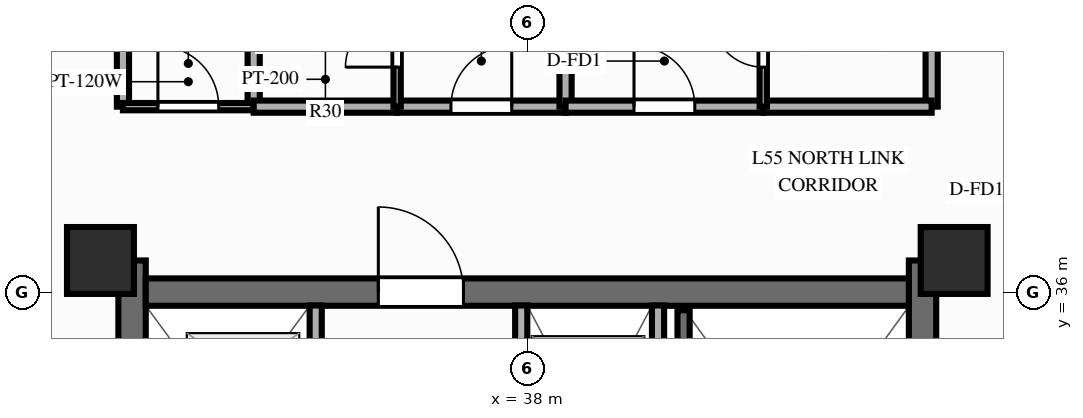
"""IFC4 building model, lengths in metres.
Left out: names, types, materials, properties, quantities, classifications, styles, units other than length and angle.
Written with IfcOpenShell. Run it as: python <this file> out.ifc"""

import sys

from ifc_helpers import new_model, si_unit, direction, frame, frame_2d, origin, origin_2d, place, context, subcontext, project, spatial, rectangle, extrude, source, transform, mapped, element, fill, save


model = new_model("IFC4")
c1 = context("Model", 3, precision=1e-05, world=origin(), true_north=direction((0.0, 1.0)))
c2 = subcontext(c1, "Body", "Model", "MODEL_VIEW")
j1 = project(units=[si_unit("LENGTHUNIT", "METRE"), si_unit("PLANEANGLEUNIT", "RADIAN")], contexts=[c1])
p1 = place(None, origin())
s1 = spatial("IfcSite", under=j1, at=p1, CompositionType="ELEMENT")
p2 = place(p1, origin())
s2 = spatial("IfcBuilding", under=s1, at=p2, CompositionType="ELEMENT")
p3 = place(p2, frame((0.0, 0.0, 176.8)))
s3 = spatial("IfcBuildingStorey", under=s2, at=p3, CompositionType="ELEMENT", Elevation=176.8)
p4 = place(p3, frame((31.5, 17.48, 0.0), z_axis=(0.0, 0.0, 1.0), x_axis=(0.0, 1.0, 0.0)))
e1 = element("IfcWall", 1, at=p4, inside=s3, PredefinedType="SHEAR", context=c2, shape_type="SweptSolid", body=[
    extrude(rectangle(XDim=19.04, YDim=0.45, at=frame_2d((9.52, 0.0))), origin(), (0.0, 0.0, 1.0), 3.0),
])
p5 = place(p4, frame((6.32, 0.0, 0.0)))
e2 = element("IfcOpeningElement", 2, at=p5, cuts=e1, PredefinedType="OPENING", context=c2, shape_type="SweptSolid", body=[
    extrude(rectangle(XDim=1.1, YDim=2.15, at=frame_2d((0.55, 1.075))), frame((0.0, 0.237, 0.0), z_axis=(0.0, -1.0, 0.0), x_axis=(1.0, 0.0, 0.0)), (0.0, 0.0, 1.0), 0.474),
])
p6 = place(p3, frame((44.5, 17.48, 0.0), z_axis=(0.0, 0.0, 1.0), x_axis=(0.0, 1.0, 0.0)))
e3 = element("IfcWall", 3, at=p6, inside=s3, PredefinedType="SHEAR", context=c2, shape_type="SweptSolid", body=[
    extrude(rectangle(XDim=19.04, YDim=0.45, at=frame_2d((9.52, 0.0))), origin(), (0.0, 0.0, 1.0), 3.0),
])
p7 = place(p6, frame((12.67, 0.0, 0.0), z_axis=(0.0, 0.0, 1.0), x_axis=(-1.0, 0.0, 0.0)))
e4 = element("IfcOpeningElement", 4, at=p7, cuts=e3, PredefinedType="OPENING", context=c2, shape_type="SweptSolid", body=[
    extrude(rectangle(XDim=1.1, YDim=2.15, at=frame_2d((0.55, 1.075))), frame((0.0, 0.237, 0.0), z_axis=(0.0, -1.0, 0.0), x_axis=(1.0, 0.0, 0.0)), (0.0, 0.0, 1.0), 0.474),
])
p8 = place(p3, frame((31.725, 36.0, 0.0), z_axis=(0.0, 0.0, 1.0), x_axis=(1.0, 0.0, 0.0)))
e5 = element("IfcWall", 5, at=p8, inside=s3, PredefinedType="SHEAR", context=c2, shape_type="SweptSolid", body=[
    extrude(rectangle(XDim=12.55, YDim=0.45, at=frame_2d((6.275, 0.0))), origin(), (0.0, 0.0, 1.0), 3.0),
])
p9 = place(p8, frame((5.225, 0.0, 0.0), z_axis=(0.0, 0.0, 1.0), x_axis=(-1.0, 0.0, 0.0)))
e6 = element("IfcOpeningElement", 6, at=p9, cuts=e5, PredefinedType="OPENING", context=c2, shape_type="SweptSolid", body=[
    extrude(rectangle(XDim=1.4, YDim=2.15, at=frame_2d((0.7, 1.075))), frame((0.0, 0.237, 0.0), z_axis=(0.0, -1.0, 0.0), x_axis=(1.0, 0.0, 0.0)), (0.0, 0.0, 1.0), 0.474),
])
m1 = source(origin(), c2, "Body", "SweptSolid", [
    extrude(rectangle(XDim=1.1, YDim=1.1, at=origin_2d()), origin(), (0.0, 0.0, 1.0), 3.0),
])
for number, where, z_axis, x_axis in (
    (7, (30.98, 36.52, 0.0), (0.0, 0.0, 1.0), (1.0, 0.0, 0.0)),
    (8, (45.02, 36.52, 0.0), (0.0, 0.0, 1.0), (1.0, 0.0, 0.0)),
):
    element("IfcColumn", number, at=place(p3, frame(where, z_axis=z_axis, x_axis=x_axis)), inside=s3, PredefinedType="COLUMN", context=c2, shape_type="MappedRepresentation", body=[
        mapped(m1, transform((0.0, 0.0, 0.0), scale=1.0)),
    ])
p10 = place(p3, frame((40.15, 31.8, 0.0), z_axis=(0.0, 0.0, 1.0), x_axis=(0.0, 1.0, 0.0)))
e9 = element("IfcWall", 9, at=p10, inside=s3, PredefinedType="PARTITIONING", context=c2, shape_type="SweptSolid", body=[
    extrude(rectangle(XDim=3.98, YDim=0.2, at=frame_2d((1.99, 0.0))), origin(), (0.0, 0.0, 1.0), 2.79),
])
p11 = place(p3, frame((40.57, 28.65, 0.0), z_axis=(0.0, 0.0, 1.0), x_axis=(0.0, 1.0, 0.0)))
e10 = element("IfcWall", 10, at=p11, inside=s3, PredefinedType="SOLIDWALL", context=c2, shape_type="SweptSolid", body=[
    extrude(rectangle(XDim=7.05, YDim=0.2, at=frame_2d((3.525, 0.0))), origin(), (0.0, 0.0, 1.0), 2.79),
])
p12 = place(p3, frame((34.52, 25.44, 0.0), z_axis=(0.0, 0.0, 1.0), x_axis=(0.0, 1.0, 0.0)))
e11 = element("IfcWall", 11, at=p12, inside=s3, PredefinedType="PARTITIONING", context=c2, shape_type="SweptSolid", body=[
    extrude(rectangle(XDim=10.34, YDim=0.2, at=frame_2d((5.17, 0.0))), origin(), (0.0, 0.0, 1.0), 2.79),
])
p13 = place(p12, frame((0.65, 0.0, 0.0)))
e12 = element("IfcOpeningElement", 12, at=p13, cuts=e11, PredefinedType="OPENING", context=c2, shape_type="SweptSolid", body=[
    extrude(rectangle(XDim=0.8, YDim=2.05, at=frame_2d((0.4, 1.025))), frame((0.0, 0.112, 0.0), z_axis=(0.0, -1.0, 0.0), x_axis=(1.0, 0.0, 0.0)), (0.0, 0.0, 1.0), 0.224),
])
p14 = place(p12, frame((2.75, 0.0, 0.0)))
e13 = element("IfcOpeningElement", 13, at=p14, cuts=e11, PredefinedType="OPENING", context=c2, shape_type="SweptSolid", body=[
    extrude(rectangle(XDim=0.8, YDim=2.05, at=frame_2d((0.4, 1.025))), frame((0.0, 0.112, 0.0), z_axis=(0.0, -1.0, 0.0), x_axis=(1.0, 0.0, 0.0)), (0.0, 0.0, 1.0), 0.224),
])
p15 = place(p12, frame((4.95, 0.0, 0.0)))
e14 = element("IfcOpeningElement", 14, at=p15, cuts=e11, PredefinedType="OPENING", context=c2, shape_type="SweptSolid", body=[
    extrude(rectangle(XDim=0.8, YDim=2.05, at=frame_2d((0.4, 1.025))), frame((0.0, 0.112, 0.0), z_axis=(0.0, -1.0, 0.0), x_axis=(1.0, 0.0, 0.0)), (0.0, 0.0, 1.0), 0.224),
])
p16 = place(p12, frame((7.01, 0.0, 0.0)))
e15 = element("IfcOpeningElement", 15, at=p16, cuts=e11, PredefinedType="OPENING", context=c2, shape_type="SweptSolid", body=[
    extrude(rectangle(XDim=1.0, YDim=2.15, at=frame_2d((0.5, 1.075))), frame((0.0, 0.112, 0.0), z_axis=(0.0, -1.0, 0.0), x_axis=(1.0, 0.0, 0.0)), (0.0, 0.0, 1.0), 0.224),
])
p17 = place(p12, frame((8.76, 0.0, 0.0)))
e16 = element("IfcOpeningElement", 16, at=p17, cuts=e11, PredefinedType="OPENING", context=c2, shape_type="SweptSolid", body=[
    extrude(rectangle(XDim=1.0, YDim=2.15, at=frame_2d((0.5, 1.075))), frame((0.0, 0.112, 0.0), z_axis=(0.0, -1.0, 0.0), x_axis=(1.0, 0.0, 0.0)), (0.0, 0.0, 1.0), 0.224),
])
p18 = place(p3, frame((37.9, 25.44, 0.0), z_axis=(0.0, 0.0, 1.0), x_axis=(0.0, 1.0, 0.0)))
e17 = element("IfcWall", 17, at=p18, inside=s3, PredefinedType="PARTITIONING", context=c2, shape_type="SweptSolid", body=[
    extrude(rectangle(XDim=10.34, YDim=0.2, at=frame_2d((5.17, 0.0))), origin(), (0.0, 0.0, 1.0), 2.79),
])
p19 = place(p18, frame((1.15, 0.0, 0.0)))
e18 = element("IfcOpeningElement", 18, at=p19, cuts=e17, PredefinedType="OPENING", context=c2, shape_type="SweptSolid", body=[
    extrude(rectangle(XDim=0.9, YDim=2.1, at=frame_2d((0.45, 1.05))), frame((0.0, 0.112, 0.0), z_axis=(0.0, -1.0, 0.0), x_axis=(1.0, 0.0, 0.0)), (0.0, 0.0, 1.0), 0.224),
])
p20 = place(p18, frame((4.2, 0.0, 0.0)))
e19 = element("IfcOpeningElement", 19, at=p20, cuts=e17, PredefinedType="OPENING", context=c2, shape_type="SweptSolid", body=[
    extrude(rectangle(XDim=0.9, YDim=2.1, at=frame_2d((0.45, 1.05))), frame((0.0, 0.112, 0.0), z_axis=(0.0, -1.0, 0.0), x_axis=(1.0, 0.0, 0.0)), (0.0, 0.0, 1.0), 0.224),
])
p21 = place(p18, frame((6.86, 0.0, 0.0)))
e20 = element("IfcOpeningElement", 20, at=p21, cuts=e17, PredefinedType="OPENING", context=c2, shape_type="SweptSolid", body=[
    extrude(rectangle(XDim=1.0, YDim=2.15, at=frame_2d((0.5, 1.075))), frame((0.0, 0.112, 0.0), z_axis=(0.0, -1.0, 0.0), x_axis=(1.0, 0.0, 0.0)), (0.0, 0.0, 1.0), 0.224),
])
p22 = place(p18, frame((8.71, 0.0, 0.0)))
e21 = element("IfcOpeningElement", 21, at=p22, cuts=e17, PredefinedType="OPENING", context=c2, shape_type="SweptSolid", body=[
    extrude(rectangle(XDim=1.0, YDim=2.15, at=frame_2d((0.5, 1.075))), frame((0.0, 0.112, 0.0), z_axis=(0.0, -1.0, 0.0), x_axis=(1.0, 0.0, 0.0)), (0.0, 0.0, 1.0), 0.224),
])
for number, where, z_axis, x_axis in (
    (22, (31.35, 39.05, 0.0), (0.0, 0.0, 1.0), (0.0, 1.0, 0.0)),
    (23, (44.65, 39.05, 0.0), (0.0, 0.0, 1.0), (0.0, 1.0, 0.0)),
):
    element("IfcWall", number, at=place(p3, frame(where, z_axis=z_axis, x_axis=x_axis)), inside=s3, PredefinedType="PARTITIONING", context=c2, shape_type="SweptSolid", body=[
        extrude(rectangle(XDim=8.8, YDim=0.2, at=frame_2d((4.4, 0.0))), origin(), (0.0, 0.0, 1.0), 2.39),
    ])
p23 = place(p3, frame((33.5, 39.05, 0.0), z_axis=(0.0, 0.0, 1.0), x_axis=(0.0, 1.0, 0.0)))
e24 = element("IfcWall", 24, at=p23, inside=s3, PredefinedType="PARTITIONING", context=c2, shape_type="SweptSolid", body=[
    extrude(rectangle(XDim=8.8, YDim=0.2, at=frame_2d((4.4, 0.0))), origin(), (0.0, 0.0, 1.0), 2.79),
])
p24 = place(p3, frame((31.35, 39.05, 0.0), z_axis=(0.0, 0.0, 1.0), x_axis=(1.0, 0.0, 0.0)))
e25 = element("IfcWall", 25, at=p24, inside=s3, PredefinedType="PARTITIONING", context=c2, shape_type="SweptSolid", body=[
    extrude(rectangle(XDim=2.15, YDim=0.12, at=frame_2d((1.075, 0.0))), origin(), (0.0, 0.0, 1.0), 2.79),
])
p25 = place(p24, frame((0.575, 0.0, 0.0)))
e26 = element("IfcOpeningElement", 26, at=p25, cuts=e25, PredefinedType="OPENING", context=c2, shape_type="SweptSolid", body=[
    extrude(rectangle(XDim=1.0, YDim=2.1, at=frame_2d((0.5, 1.05))), frame((0.0, 0.072, 0.0), z_axis=(0.0, -1.0, 0.0), x_axis=(1.0, 0.0, 0.0)), (0.0, 0.0, 1.0), 0.144),
])
p26 = place(p3, frame((33.5, 39.05, 0.0), z_axis=(0.0, 0.0, 1.0), x_axis=(1.0, 0.0, 0.0)))
e27 = element("IfcWall", 27, at=p26, inside=s3, PredefinedType="PARTITIONING", context=c2, shape_type="SweptSolid", body=[
    extrude(rectangle(XDim=2.359, YDim=0.2, at=frame_2d((1.18, 0.0))), origin(), (0.0, 0.0, 1.0), 2.79),
])
p27 = place(p3, frame((35.859, 39.05, 0.0), z_axis=(0.0, 0.0, 1.0), x_axis=(1.0, 0.0, 0.0)))
e28 = element("IfcWall", 28, at=p27, inside=s3, PredefinedType="PARTITIONING", context=c2, shape_type="SweptSolid", body=[
    extrude(rectangle(XDim=2.77, YDim=0.2, at=frame_2d((1.385, 0.0))), origin(), (0.0, 0.0, 1.0), 2.79),
])
p28 = place(p27, frame((0.885, 0.0, 0.0)))
e29 = element("IfcOpeningElement", 29, at=p28, cuts=e28, PredefinedType="OPENING", context=c2, shape_type="SweptSolid", body=[
    extrude(rectangle(XDim=1.0, YDim=2.15, at=frame_2d((0.5, 1.075))), frame((0.0, 0.112, 0.0), z_axis=(0.0, -1.0, 0.0), x_axis=(1.0, 0.0, 0.0)), (0.0, 0.0, 1.0), 0.224),
])
p29 = place(p3, frame((35.859, 39.05, 0.0), z_axis=(0.0, 0.0, 1.0), x_axis=(0.0, 1.0, 0.0)))
e30 = element("IfcWall", 30, at=p29, inside=s3, PredefinedType="PARTITIONING", context=c2, shape_type="SweptSolid", body=[
    extrude(rectangle(XDim=2.15, YDim=0.12, at=frame_2d((1.075, 0.0))), origin(), (0.0, 0.0, 1.0), 2.79),
])
p30 = place(p29, frame((0.65, 0.0, 0.0)))
e31 = element("IfcOpeningElement", 31, at=p30, cuts=e30, PredefinedType="OPENING", context=c2, shape_type="SweptSolid", body=[
    extrude(rectangle(XDim=0.85, YDim=2.05, at=frame_2d((0.425, 1.025))), frame((0.0, 0.072, 0.0), z_axis=(0.0, -1.0, 0.0), x_axis=(1.0, 0.0, 0.0)), (0.0, 0.0, 1.0), 0.144),
])
p31 = place(p3, frame((38.629, 39.05, 0.0), z_axis=(0.0, 0.0, 1.0), x_axis=(0.0, 1.0, 0.0)))
e32 = element("IfcWall", 32, at=p31, inside=s3, PredefinedType="PARTITIONING", context=c2, shape_type="SweptSolid", body=[
    extrude(rectangle(XDim=8.8, YDim=0.2, at=frame_2d((4.4, 0.0))), origin(), (0.0, 0.0, 1.0), 2.79),
])
p32 = place(p3, frame((38.629, 39.05, 0.0), z_axis=(0.0, 0.0, 1.0), x_axis=(1.0, 0.0, 0.0)))
e33 = element("IfcWall", 33, at=p32, inside=s3, PredefinedType="PARTITIONING", context=c2, shape_type="SweptSolid", body=[
    extrude(rectangle(XDim=3.251, YDim=0.2, at=frame_2d((1.626, 0.0))), origin(), (0.0, 0.0, 1.0), 2.79),
])
p33 = place(p32, frame((1.126, 0.0, 0.0)))
e34 = element("IfcOpeningElement", 34, at=p33, cuts=e33, PredefinedType="OPENING", context=c2, shape_type="SweptSolid", body=[
    extrude(rectangle(XDim=1.0, YDim=2.15, at=frame_2d((0.5, 1.075))), frame((0.0, 0.112, 0.0), z_axis=(0.0, -1.0, 0.0), x_axis=(1.0, 0.0, 0.0)), (0.0, 0.0, 1.0), 0.224),
])
p34 = place(p3, frame((41.88, 39.05, 0.0), z_axis=(0.0, 0.0, 1.0), x_axis=(1.0, 0.0, 0.0)))
e35 = element("IfcWall", 35, at=p34, inside=s3, PredefinedType="PARTITIONING", context=c2, shape_type="SweptSolid", body=[
    extrude(rectangle(XDim=2.77, YDim=0.2, at=frame_2d((1.385, 0.0))), origin(), (0.0, 0.0, 1.0), 2.79),
])
p35 = place(p3, frame((41.88, 39.05, 0.0), z_axis=(0.0, 0.0, 1.0), x_axis=(0.0, 1.0, 0.0)))
e36 = element("IfcWall", 36, at=p35, inside=s3, PredefinedType="PARTITIONING", context=c2, shape_type="SweptSolid", body=[
    extrude(rectangle(XDim=2.15, YDim=0.12, at=frame_2d((1.075, 0.0))), origin(), (0.0, 0.0, 1.0), 2.79),
])
p36 = place(p35, frame((0.65, 0.0, 0.0)))
e37 = element("IfcOpeningElement", 37, at=p36, cuts=e36, PredefinedType="OPENING", context=c2, shape_type="SweptSolid", body=[
    extrude(rectangle(XDim=0.85, YDim=2.05, at=frame_2d((0.425, 1.025))), frame((0.0, 0.072, 0.0), z_axis=(0.0, -1.0, 0.0), x_axis=(1.0, 0.0, 0.0)), (0.0, 0.0, 1.0), 0.144),
])
m2 = source(origin(), c2, "Body", "SweptSolid", [
    extrude(rectangle(XDim=1.4, YDim=2.15, at=frame_2d((0.7, 1.075))), frame((0.0, 0.025, 0.0), z_axis=(0.0, -1.0, 0.0), x_axis=(1.0, 0.0, 0.0)), (0.0, 0.0, 1.0), 0.05),
])
p37 = place(p9, origin())
e38 = element("IfcDoor", 38, at=p37, inside=s3, OperationType="SINGLE_SWING_RIGHT", PredefinedType="DOOR", context=c2, shape_type="MappedRepresentation", body=[
    mapped(m2, transform((0.0, 0.0, 0.0), scale=1.0)),
])
fill(e6, e38)
m3 = source(origin(), c2, "Body", "SweptSolid", [
    extrude(rectangle(XDim=1.0, YDim=2.1, at=frame_2d((0.5, 1.05))), frame((0.0, 0.025, 0.0), z_axis=(0.0, -1.0, 0.0), x_axis=(1.0, 0.0, 0.0)), (0.0, 0.0, 1.0), 0.05),
])
p38 = place(p25, origin())
e39 = element("IfcDoor", 39, at=p38, inside=s3, OperationType="SINGLE_SWING_LEFT", PredefinedType="DOOR", context=c2, shape_type="MappedRepresentation", body=[
    mapped(m3, transform((0.0, 0.0, 0.0), scale=1.0)),
])
fill(e26, e39)
m4 = source(origin(), c2, "Body", "SweptSolid", [
    extrude(rectangle(XDim=1.0, YDim=2.15, at=frame_2d((0.5, 1.075))), frame((0.0, 0.025, 0.0), z_axis=(0.0, -1.0, 0.0), x_axis=(1.0, 0.0, 0.0)), (0.0, 0.0, 1.0), 0.05),
])
p39 = place(p28, origin())
e40 = element("IfcDoor", 40, at=p39, inside=s3, OperationType="SINGLE_SWING_RIGHT", PredefinedType="DOOR", context=c2, shape_type="MappedRepresentation", body=[
    mapped(m4, transform((0.0, 0.0, 0.0), scale=1.0)),
])
fill(e29, e40)
m5 = source(origin(), c2, "Body", "SweptSolid", [
    extrude(rectangle(XDim=0.85, YDim=2.05, at=frame_2d((0.425, 1.025))), frame((0.0, 0.025, 0.0), z_axis=(0.0, -1.0, 0.0), x_axis=(1.0, 0.0, 0.0)), (0.0, 0.0, 1.0), 0.05),
])
p40 = place(p30, origin())
e41 = element("IfcDoor", 41, at=p40, inside=s3, OperationType="SINGLE_SWING_LEFT", PredefinedType="DOOR", context=c2, shape_type="MappedRepresentation", body=[
    mapped(m5, transform((0.0, 0.0, 0.0), scale=1.0)),
])
fill(e31, e41)
p41 = place(p33, origin())
e42 = element("IfcDoor", 42, at=p41, inside=s3, OperationType="SINGLE_SWING_LEFT", PredefinedType="DOOR", context=c2, shape_type="MappedRepresentation", body=[
    mapped(m4, transform((0.0, 0.0, 0.0), scale=1.0)),
])
fill(e34, e42)
p42 = place(p36, origin())
e43 = element("IfcDoor", 43, at=p42, inside=s3, OperationType="SINGLE_SWING_RIGHT", PredefinedType="DOOR", context=c2, shape_type="MappedRepresentation", body=[
    mapped(m5, transform((0.0, 0.0, 0.0), scale=1.0)),
])
fill(e37, e43)
save(model, sys.argv[1])
